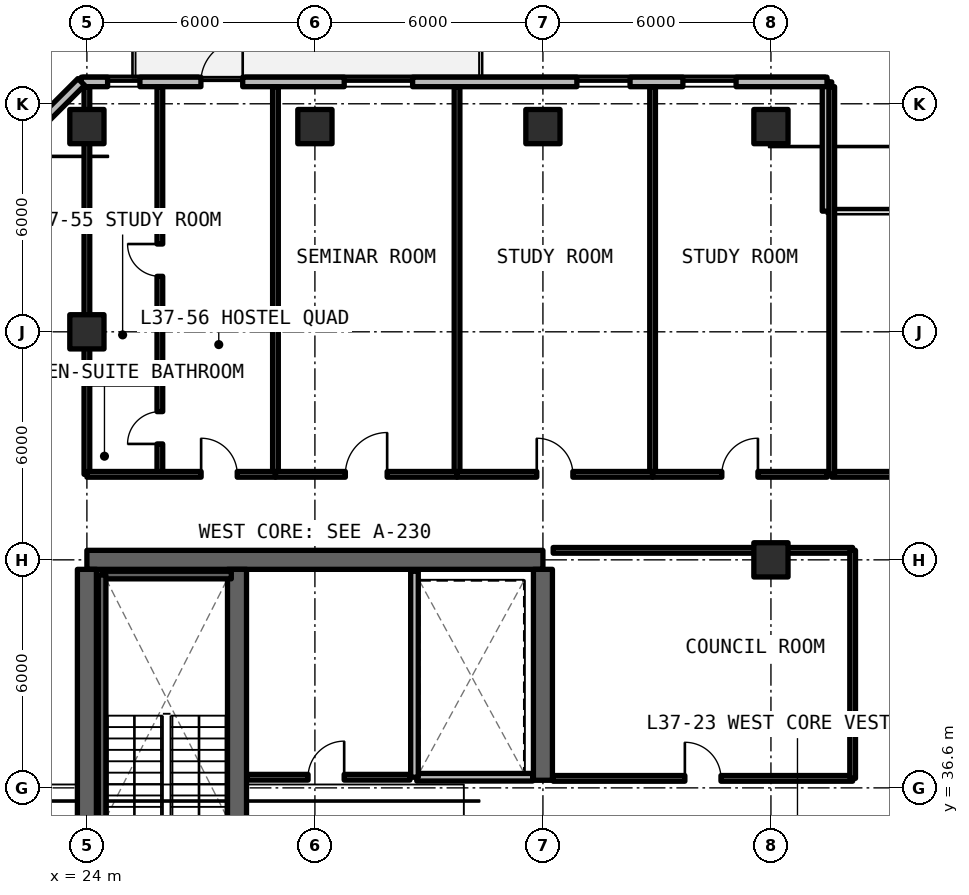
"""IFC4 building model, lengths in metres.
Left out: names, types, materials, properties, quantities, classifications, styles, units other than length and angle.
Written with IfcOpenShell. Run it as: python <this file> out.ifc"""

import sys

from ifc_helpers import new_model, si_unit, direction, frame, frame_2d, origin, origin_2d, place, context, subcontext, project, spatial, rectangle, extrude, element, fill, save


model = new_model("IFC4")
c1 = context("Model", 3, precision=1e-05, world=origin(), true_north=direction((0.0, 1.0)))
c2 = subcontext(c1, "Body", "Model", "MODEL_VIEW")
j1 = project(units=[si_unit("LENGTHUNIT", "METRE"), si_unit("PLANEANGLEUNIT", "RADIAN")], contexts=[c1])
p1 = place(None, origin())
s1 = spatial("IfcSite", under=j1, at=p1, CompositionType="ELEMENT")
p2 = place(p1, origin())
s2 = spatial("IfcBuilding", under=s1, at=p2, CompositionType="ELEMENT")
p3 = place(p2, frame((0.0, 0.0, 135.3)))
s3 = spatial("IfcBuildingStorey", under=s2, at=p3, CompositionType="ELEMENT", Elevation=135.3)
p4 = place(p3, frame((36.0, 42.6, 0.0), z_axis=(0.0, 0.0, 1.0), x_axis=(-1.0, 0.0, 0.0)))
e1 = element("IfcWall", 1, at=p4, inside=s3, PredefinedType="SHEAR", context=c2, shape_type="SweptSolid", body=[
    extrude(rectangle(XDim=12.0, YDim=0.5, at=frame_2d((6.0, 0.0))), origin(), (0.0, 0.0, 1.0), 3.3),
])
p5 = place(p3, frame((24.0, 24.85, 0.0), z_axis=(0.0, 0.0, 1.0), x_axis=(0.0, 1.0, 0.0)))
e2 = element("IfcWall", 2, at=p5, inside=s3, PredefinedType="SHEAR", context=c2, shape_type="SweptSolid", body=[
    extrude(rectangle(XDim=17.5, YDim=0.5, at=frame_2d((8.75, 0.0))), origin(), (0.0, 0.0, 1.0), 3.3),
])
p6 = place(p3, frame((36.0, 36.8, 0.0), z_axis=(0.0, 0.0, 1.0), x_axis=(0.0, 1.0, 0.0)))
e3 = element("IfcWall", 3, at=p6, inside=s3, PredefinedType="SHEAR", context=c2, shape_type="SweptSolid", body=[
    extrude(rectangle(XDim=5.55, YDim=0.5, at=frame_2d((2.775, 0.0))), origin(), (0.0, 0.0, 1.0), 3.3),
])
p7 = place(p3, frame((27.95, 24.85, 0.0), z_axis=(0.0, 0.0, 1.0), x_axis=(0.0, 1.0, 0.0)))
e4 = element("IfcWall", 4, at=p7, inside=s3, PredefinedType="SHEAR", context=c2, shape_type="SweptSolid", body=[
    extrude(rectangle(XDim=17.5, YDim=0.5, at=frame_2d((8.75, 0.0))), origin(), (0.0, 0.0, 1.0), 3.3),
])
p8 = place(p7, frame((0.4, 0.0, 0.0)))
e5 = element("IfcOpeningElement", 5, at=p8, cuts=e4, PredefinedType="OPENING", context=c2, shape_type="SweptSolid", body=[
    extrude(rectangle(XDim=1.15, YDim=2.15, at=frame_2d((0.575, 1.075))), frame((0.0, 0.26, 0.0), z_axis=(0.0, -1.0, 0.0), x_axis=(1.0, 0.0, 0.0)), (0.0, 0.0, 1.0), 0.52),
])
p9 = place(p7, frame((9.6, 0.0, 0.0)))
e6 = element("IfcOpeningElement", 6, at=p9, cuts=e4, PredefinedType="OPENING", context=c2, shape_type="SweptSolid", body=[
    extrude(rectangle(XDim=1.15, YDim=2.15, at=frame_2d((0.575, 1.075))), frame((0.0, 0.26, 0.0), z_axis=(0.0, -1.0, 0.0), x_axis=(1.0, 0.0, 0.0)), (0.0, 0.0, 1.0), 0.52),
])
for number, where, z_axis, x_axis in (
    (7, (42.0, 42.6, 0.0), (0.0, 0.0, 1.0), (1.0, 0.0, 0.0)),
    (8, (24.0, 48.6, 0.0), (0.0, 0.0, 1.0), (1.0, 0.0, 0.0)),
    (9, (24.0, 54.0, 0.0), (0.0, 0.0, 1.0), (1.0, 0.0, 0.0)),
    (10, (30.0, 54.0, 0.0), (0.0, 0.0, 1.0), (1.0, 0.0, 0.0)),
    (11, (36.0, 54.0, 0.0), (0.0, 0.0, 1.0), (1.0, 0.0, 0.0)),
    (12, (42.0, 54.0, 0.0), (0.0, 0.0, 1.0), (1.0, 0.0, 0.0)),
):
    element("IfcColumn", number, at=place(p3, frame(where, z_axis=z_axis, x_axis=x_axis)), inside=s3, PredefinedType="COLUMN", context=c2, shape_type="SweptSolid", body=[
        extrude(rectangle(XDim=0.9, YDim=0.9, at=origin_2d()), origin(), (0.0, 0.0, 1.0), 3.3),
    ])
p10 = place(p3, frame((43.475, 51.775, 0.0), z_axis=(0.0, 0.0, 1.0), x_axis=(0.0, 1.0, 0.0)))
e13 = element("IfcWall", 13, at=p10, inside=s3, PredefinedType="SOLIDWALL", context=c2, shape_type="SweptSolid", body=[
    extrude(rectangle(XDim=3.4, YDim=0.25, at=frame_2d((1.7, 0.0))), origin(), (0.0, 0.0, 1.0), 3.08),
])
p11 = place(p3, frame((43.475, 55.175, 0.0), z_axis=(0.0, 0.0, 1.0), x_axis=(-1.0, 0.0, 0.0)))
e14 = element("IfcWall", 14, at=p11, inside=s3, PredefinedType="SOLIDWALL", context=c2, shape_type="SweptSolid", body=[
    extrude(rectangle(XDim=19.623, YDim=0.25, at=frame_2d((9.812, 0.0))), origin(), (0.0, 0.0, 1.0), 3.08),
])
p12 = place(p11, frame((15.375, 0.0, 0.0)))
e15 = element("IfcOpeningElement", 15, at=p12, cuts=e14, PredefinedType="OPENING", context=c2, shape_type="SweptSolid", body=[
    extrude(rectangle(XDim=1.1, YDim=2.15, at=frame_2d((0.55, 1.075))), frame((0.0, 0.135, 0.0), z_axis=(0.0, -1.0, 0.0), x_axis=(1.0, 0.0, 0.0)), (0.0, 0.0, 1.0), 0.27),
])
p13 = place(p11, frame((18.08, 0.0, 0.78)))
e16 = element("IfcOpeningElement", 16, at=p13, cuts=e14, PredefinedType="OPENING", context=c2, shape_type="SweptSolid", body=[
    extrude(rectangle(XDim=0.85, YDim=1.65, at=frame_2d((0.425, 0.825))), frame((0.0, 0.135, 0.0), z_axis=(0.0, -1.0, 0.0), x_axis=(1.0, 0.0, 0.0)), (0.0, 0.0, 1.0), 0.27),
])
p14 = place(p11, frame((10.904, 0.0, 0.78)))
e17 = element("IfcOpeningElement", 17, at=p14, cuts=e14, PredefinedType="OPENING", context=c2, shape_type="SweptSolid", body=[
    extrude(rectangle(XDim=1.8, YDim=1.66, at=frame_2d((0.9, 0.83))), frame((0.0, 0.135, 0.0), z_axis=(0.0, -1.0, 0.0), x_axis=(1.0, 0.0, 0.0)), (0.0, 0.0, 1.0), 0.27),
])
p15 = place(p11, frame((5.182, 0.0, 0.78)))
e18 = element("IfcOpeningElement", 18, at=p15, cuts=e14, PredefinedType="OPENING", context=c2, shape_type="SweptSolid", body=[
    extrude(rectangle(XDim=1.4, YDim=1.65, at=frame_2d((0.7, 0.825))), frame((0.0, 0.135, 0.0), z_axis=(0.0, -1.0, 0.0), x_axis=(1.0, 0.0, 0.0)), (0.0, 0.0, 1.0), 0.27),
])
p16 = place(p11, frame((2.392, 0.0, 0.78)))
e19 = element("IfcOpeningElement", 19, at=p16, cuts=e14, PredefinedType="OPENING", context=c2, shape_type="SweptSolid", body=[
    extrude(rectangle(XDim=1.4, YDim=1.65, at=frame_2d((0.7, 0.825))), frame((0.0, 0.135, 0.0), z_axis=(0.0, -1.0, 0.0), x_axis=(1.0, 0.0, 0.0)), (0.0, 0.0, 1.0), 0.27),
])
p17 = place(p3, frame((23.852, 55.175, 0.0), z_axis=(0.0, 0.0, 1.0), x_axis=(-0.70708586489, -0.707127696864, 0.0)))
e20 = element("IfcWall", 20, at=p17, inside=s3, PredefinedType="SOLIDWALL", context=c2, shape_type="SweptSolid", body=[
    extrude(rectangle(XDim=5.836, YDim=0.25, at=frame_2d((2.918, 0.0))), origin(), (0.0, 0.0, 1.0), 3.08),
])
p18 = place(p17, frame((1.538, 0.0, 0.78)))
e21 = element("IfcOpeningElement", 21, at=p18, cuts=e20, PredefinedType="OPENING", context=c2, shape_type="SweptSolid", body=[
    extrude(rectangle(XDim=3.4, YDim=1.66, at=frame_2d((1.7, 0.83))), frame((0.0, 0.135, 0.0), z_axis=(0.0, -1.0, 0.0), x_axis=(1.0, 0.0, 0.0)), (0.0, 0.0, 1.0), 0.27),
])
p19 = place(p3, frame((28.22, 36.88, 0.0), z_axis=(0.0, 0.0, 1.0), x_axis=(1.0, 0.0, 0.0)))
e22 = element("IfcWall", 22, at=p19, inside=s3, PredefinedType="SOLIDWALL", context=c2, shape_type="SweptSolid", body=[
    extrude(rectangle(XDim=4.28, YDim=0.15, at=frame_2d((2.14, 0.0))), origin(), (0.0, 0.0, 1.0), 2.35),
])
p20 = place(p19, frame((1.6, 0.0, 0.0)))
e23 = element("IfcOpeningElement", 23, at=p20, cuts=e22, PredefinedType="OPENING", context=c2, shape_type="SweptSolid", body=[
    extrude(rectangle(XDim=0.95, YDim=2.15, at=frame_2d((0.475, 1.075))), frame((0.0, 0.085, 0.0), z_axis=(0.0, -1.0, 0.0), x_axis=(1.0, 0.0, 0.0)), (0.0, 0.0, 1.0), 0.17),
])
p21 = place(p3, frame((32.68, 36.88, 0.0), z_axis=(0.0, 0.0, 1.0), x_axis=(1.0, 0.0, 0.0)))
e24 = element("IfcWall", 24, at=p21, inside=s3, PredefinedType="SOLIDWALL", context=c2, shape_type="SweptSolid", body=[
    extrude(rectangle(XDim=3.05, YDim=0.2, at=frame_2d((1.525, 0.0))), origin(), (0.0, 0.0, 1.0), 2.35),
])
p22 = place(p3, frame((32.62, 36.88, 0.0), z_axis=(0.0, 0.0, 1.0), x_axis=(0.0, 1.0, 0.0)))
e25 = element("IfcWall", 25, at=p22, inside=s3, PredefinedType="SOLIDWALL", context=c2, shape_type="SweptSolid", body=[
    extrude(rectangle(XDim=5.42, YDim=0.2, at=frame_2d((2.71, 0.0))), origin(), (0.0, 0.0, 1.0), 2.35),
])
p23 = place(p3, frame((36.27, 36.85, 0.0), z_axis=(0.0, 0.0, 1.0), x_axis=(1.0, 0.0, 0.0)))
e26 = element("IfcWall", 26, at=p23, inside=s3, PredefinedType="SOLIDWALL", context=c2, shape_type="SweptSolid", body=[
    extrude(rectangle(XDim=7.88, YDim=0.15, at=frame_2d((3.94, 0.0))), origin(), (0.0, 0.0, 1.0), 2.35),
])
p24 = place(p23, frame((3.465, 0.0, 0.0)))
e27 = element("IfcOpeningElement", 27, at=p24, cuts=e26, PredefinedType="OPENING", context=c2, shape_type="SweptSolid", body=[
    extrude(rectangle(XDim=0.95, YDim=2.15, at=frame_2d((0.475, 1.075))), frame((0.0, 0.085, 0.0), z_axis=(0.0, -1.0, 0.0), x_axis=(1.0, 0.0, 0.0)), (0.0, 0.0, 1.0), 0.17),
])
p25 = place(p3, frame((36.27, 42.85, 0.0), z_axis=(0.0, 0.0, 1.0), x_axis=(1.0, 0.0, 0.0)))
e28 = element("IfcWall", 28, at=p25, inside=s3, PredefinedType="SOLIDWALL", context=c2, shape_type="SweptSolid", body=[
    extrude(rectangle(XDim=7.88, YDim=0.15, at=frame_2d((3.94, 0.0))), origin(), (0.0, 0.0, 1.0), 2.35),
])
p26 = place(p3, frame((44.15, 36.85, 0.0), z_axis=(0.0, 0.0, 1.0), x_axis=(0.0, 1.0, 0.0)))
e29 = element("IfcWall", 29, at=p26, inside=s3, PredefinedType="SOLIDWALL", context=c2, shape_type="SweptSolid", body=[
    extrude(rectangle(XDim=6.0, YDim=0.15, at=frame_2d((3.0, 0.0))), origin(), (0.0, 0.0, 1.0), 2.35),
])
p27 = place(p3, frame((43.6, 44.85, 0.0), z_axis=(0.0, 0.0, 1.0), x_axis=(1.0, 0.0, 0.0)))
e30 = element("IfcWall", 30, at=p27, inside=s3, PredefinedType="SOLIDWALL", context=c2, shape_type="SweptSolid", body=[
    extrude(rectangle(XDim=8.4, YDim=0.15, at=frame_2d((4.2, 0.0))), origin(), (0.0, 0.0, 1.0), 2.35),
])
p28 = place(p27, frame((3.65, 0.0, 0.0)))
e31 = element("IfcOpeningElement", 31, at=p28, cuts=e30, PredefinedType="OPENING", context=c2, shape_type="SweptSolid", body=[
    extrude(rectangle(XDim=1.1, YDim=2.15, at=frame_2d((0.55, 1.075))), frame((0.0, 0.085, 0.0), z_axis=(0.0, -1.0, 0.0), x_axis=(1.0, 0.0, 0.0)), (0.0, 0.0, 1.0), 0.17),
])
for number, where, z_axis, x_axis in (
    (32, (43.6, 44.85, 0.0), (0.0, 0.0, 1.0), (0.0, 1.0, 0.0)),
    (33, (24.0, 44.85, 0.0), (0.0, 0.0, 1.0), (0.0, 1.0, 0.0)),
    (34, (28.962, 44.85, 0.0), (0.0, 0.0, 1.0), (0.0, 1.0, 0.0)),
):
    element("IfcWall", number, at=place(p3, frame(where, z_axis=z_axis, x_axis=x_axis)), inside=s3, PredefinedType="SOLIDWALL", context=c2, shape_type="SweptSolid", body=[
        extrude(rectangle(XDim=10.2, YDim=0.15, at=frame_2d((5.1, 0.0))), origin(), (0.0, 0.0, 1.0), 2.35),
    ])
p29 = place(p3, frame((24.0, 47.3, 0.0), z_axis=(0.0, 0.0, 1.0), x_axis=(1.0, 0.0, 0.0)))
e35 = element("IfcWall", 35, at=p29, inside=s3, PredefinedType="PARTITIONING", context=c2, shape_type="SweptSolid", body=[
    extrude(rectangle(XDim=1.92, YDim=0.15, at=frame_2d((0.96, 0.0))), origin(), (0.0, 0.0, 1.0), 2.35),
])
p30 = place(p3, frame((25.92, 44.85, 0.0), z_axis=(0.0, 0.0, 1.0), x_axis=(0.0, 1.0, 0.0)))
e36 = element("IfcWall", 36, at=p30, inside=s3, PredefinedType="PARTITIONING", context=c2, shape_type="SweptSolid", body=[
    extrude(rectangle(XDim=10.2, YDim=0.15, at=frame_2d((5.1, 0.0))), origin(), (0.0, 0.0, 1.0), 2.35),
])
p31 = place(p30, frame((0.8, 0.0, 0.0)))
e37 = element("IfcOpeningElement", 37, at=p31, cuts=e36, PredefinedType="OPENING", context=c2, shape_type="SweptSolid", body=[
    extrude(rectangle(XDim=0.85, YDim=2.1, at=frame_2d((0.425, 1.05))), frame((0.0, 0.085, 0.0), z_axis=(0.0, -1.0, 0.0), x_axis=(1.0, 0.0, 0.0)), (0.0, 0.0, 1.0), 0.17),
])
p32 = place(p30, frame((5.21, 0.0, 0.0)))
e38 = element("IfcOpeningElement", 38, at=p32, cuts=e36, PredefinedType="OPENING", context=c2, shape_type="SweptSolid", body=[
    extrude(rectangle(XDim=0.85, YDim=2.1, at=frame_2d((0.425, 1.05))), frame((0.0, 0.085, 0.0), z_axis=(0.0, -1.0, 0.0), x_axis=(1.0, 0.0, 0.0)), (0.0, 0.0, 1.0), 0.17),
])
p33 = place(p3, frame((24.0, 44.85, 0.0), z_axis=(0.0, 0.0, 1.0), x_axis=(1.0, 0.0, 0.0)))
e39 = element("IfcWall", 39, at=p33, inside=s3, PredefinedType="SOLIDWALL", context=c2, shape_type="SweptSolid", body=[
    extrude(rectangle(XDim=4.962, YDim=0.15, at=frame_2d((2.481, 0.0))), origin(), (0.0, 0.0, 1.0), 2.35),
])
p34 = place(p33, frame((3.006, 0.0, 0.0)))
e40 = element("IfcOpeningElement", 40, at=p34, cuts=e39, PredefinedType="OPENING", context=c2, shape_type="SweptSolid", body=[
    extrude(rectangle(XDim=0.95, YDim=2.15, at=frame_2d((0.475, 1.075))), frame((0.0, 0.085, 0.0), z_axis=(0.0, -1.0, 0.0), x_axis=(1.0, 0.0, 0.0)), (0.0, 0.0, 1.0), 0.17),
])
p35 = place(p3, frame((33.74, 44.85, 0.0), z_axis=(0.0, 0.0, 1.0), x_axis=(0.0, 1.0, 0.0)))
e41 = element("IfcWall", 41, at=p35, inside=s3, PredefinedType="SOLIDWALL", context=c2, shape_type="SweptSolid", body=[
    extrude(rectangle(XDim=10.2, YDim=0.15, at=frame_2d((5.1, 0.0))), origin(), (0.0, 0.0, 1.0), 2.35),
])
p36 = place(p3, frame((28.962, 44.85, 0.0), z_axis=(0.0, 0.0, 1.0), x_axis=(1.0, 0.0, 0.0)))
e42 = element("IfcWall", 42, at=p36, inside=s3, PredefinedType="SOLIDWALL", context=c2, shape_type="SweptSolid", body=[
    extrude(rectangle(XDim=4.778, YDim=0.15, at=frame_2d((2.389, 0.0))), origin(), (0.0, 0.0, 1.0), 2.35),
])
p37 = place(p36, frame((1.839, 0.0, 0.0)))
e43 = element("IfcOpeningElement", 43, at=p37, cuts=e42, PredefinedType="OPENING", context=c2, shape_type="SweptSolid", body=[
    extrude(rectangle(XDim=1.1, YDim=2.15, at=frame_2d((0.55, 1.075))), frame((0.0, 0.085, 0.0), z_axis=(0.0, -1.0, 0.0), x_axis=(1.0, 0.0, 0.0)), (0.0, 0.0, 1.0), 0.17),
])
p38 = place(p3, frame((38.886, 44.85, 0.0), z_axis=(0.0, 0.0, 1.0), x_axis=(0.0, 1.0, 0.0)))
e44 = element("IfcWall", 44, at=p38, inside=s3, PredefinedType="SOLIDWALL", context=c2, shape_type="SweptSolid", body=[
    extrude(rectangle(XDim=10.2, YDim=0.15, at=frame_2d((5.1, 0.0))), origin(), (0.0, 0.0, 1.0), 2.35),
])
p39 = place(p3, frame((33.74, 44.85, 0.0), z_axis=(0.0, 0.0, 1.0), x_axis=(1.0, 0.0, 0.0)))
e45 = element("IfcWall", 45, at=p39, inside=s3, PredefinedType="SOLIDWALL", context=c2, shape_type="SweptSolid", body=[
    extrude(rectangle(XDim=5.146, YDim=0.15, at=frame_2d((2.573, 0.0))), origin(), (0.0, 0.0, 1.0), 2.35),
])
p40 = place(p39, frame((2.098, 0.0, 0.0)))
e46 = element("IfcOpeningElement", 46, at=p40, cuts=e45, PredefinedType="OPENING", context=c2, shape_type="SweptSolid", body=[
    extrude(rectangle(XDim=0.95, YDim=2.15, at=frame_2d((0.475, 1.075))), frame((0.0, 0.085, 0.0), z_axis=(0.0, -1.0, 0.0), x_axis=(1.0, 0.0, 0.0)), (0.0, 0.0, 1.0), 0.17),
])
p41 = place(p3, frame((38.886, 44.85, 0.0), z_axis=(0.0, 0.0, 1.0), x_axis=(1.0, 0.0, 0.0)))
e47 = element("IfcWall", 47, at=p41, inside=s3, PredefinedType="SOLIDWALL", context=c2, shape_type="SweptSolid", body=[
    extrude(rectangle(XDim=4.594, YDim=0.15, at=frame_2d((2.297, 0.0))), origin(), (0.0, 0.0, 1.0), 2.35),
])
p42 = place(p41, frame((1.822, 0.0, 0.0)))
e48 = element("IfcOpeningElement", 48, at=p42, cuts=e47, PredefinedType="OPENING", context=c2, shape_type="SweptSolid", body=[
    extrude(rectangle(XDim=0.95, YDim=2.15, at=frame_2d((0.475, 1.075))), frame((0.0, 0.085, 0.0), z_axis=(0.0, -1.0, 0.0), x_axis=(1.0, 0.0, 0.0)), (0.0, 0.0, 1.0), 0.17),
])
p43 = place(p3, frame((27.8, 42.2, 0.0), z_axis=(0.0, 0.0, 1.0), x_axis=(-1.0, 0.0, 0.0)))
e49 = element("IfcWall", 49, at=p43, inside=s3, PredefinedType="SOLIDWALL", context=c2, shape_type="SweptSolid", body=[
    extrude(rectangle(XDim=3.4, YDim=0.2, at=frame_2d((1.7, 0.0))), origin(), (0.0, 0.0, 1.0), 3.3),
])
p44 = place(p3, frame((24.4, 42.2, 0.0), z_axis=(0.0, 0.0, 1.0), x_axis=(0.0, -1.0, 0.0)))
e50 = element("IfcWall", 50, at=p44, inside=s3, PredefinedType="SOLIDWALL", context=c2, shape_type="SweptSolid", body=[
    extrude(rectangle(XDim=8.0, YDim=0.2, at=frame_2d((4.0, 0.0))), origin(), (0.0, 0.0, 1.0), 3.3),
])
p45 = place(p12, frame((1.1, 0.0, 0.0), z_axis=(0.0, 0.0, 1.0), x_axis=(-1.0, 0.0, 0.0)))
e51 = element("IfcDoor", 51, at=p45, inside=s3, OperationType="SINGLE_SWING_RIGHT", PredefinedType="DOOR", context=c2, shape_type="SweptSolid", body=[
    extrude(rectangle(XDim=1.1, YDim=2.15, at=frame_2d((0.55, 1.075))), frame((0.0, 0.025, 0.0), z_axis=(0.0, -1.0, 0.0), x_axis=(1.0, 0.0, 0.0)), (0.0, 0.0, 1.0), 0.05),
])
fill(e15, e51)
p46 = place(p13, origin())
e52 = element("IfcWindow", 52, at=p46, inside=s3, PartitioningType="SINGLE_PANEL", PredefinedType="WINDOW", context=c2, shape_type="SweptSolid", body=[
    extrude(rectangle(XDim=0.85, YDim=1.65, at=frame_2d((0.425, 0.825))), frame((0.0, 0.03, 0.0), z_axis=(0.0, -1.0, 0.0), x_axis=(1.0, 0.0, 0.0)), (0.0, 0.0, 1.0), 0.06),
])
fill(e16, e52)
p47 = place(p14, origin())
e53 = element("IfcWindow", 53, at=p47, inside=s3, PartitioningType="SINGLE_PANEL", PredefinedType="WINDOW", context=c2, shape_type="SweptSolid", body=[
    extrude(rectangle(XDim=1.8, YDim=1.66, at=frame_2d((0.9, 0.83))), frame((0.0, 0.03, 0.0), z_axis=(0.0, -1.0, 0.0), x_axis=(1.0, 0.0, 0.0)), (0.0, 0.0, 1.0), 0.06),
])
fill(e17, e53)
p48 = place(p15, origin())
e54 = element("IfcWindow", 54, at=p48, inside=s3, PartitioningType="SINGLE_PANEL", PredefinedType="WINDOW", context=c2, shape_type="SweptSolid", body=[
    extrude(rectangle(XDim=1.4, YDim=1.65, at=frame_2d((0.7, 0.825))), frame((0.0, 0.03, 0.0), z_axis=(0.0, -1.0, 0.0), x_axis=(1.0, 0.0, 0.0)), (0.0, 0.0, 1.0), 0.06),
])
fill(e18, e54)
p49 = place(p16, origin())
e55 = element("IfcWindow", 55, at=p49, inside=s3, PartitioningType="SINGLE_PANEL", PredefinedType="WINDOW", context=c2, shape_type="SweptSolid", body=[
    extrude(rectangle(XDim=1.4, YDim=1.65, at=frame_2d((0.7, 0.825))), frame((0.0, 0.03, 0.0), z_axis=(0.0, -1.0, 0.0), x_axis=(1.0, 0.0, 0.0)), (0.0, 0.0, 1.0), 0.06),
])
fill(e19, e55)
p50 = place(p20, origin())
e56 = element("IfcDoor", 56, at=p50, inside=s3, OperationType="SINGLE_SWING_RIGHT", PredefinedType="DOOR", context=c2, shape_type="SweptSolid", body=[
    extrude(rectangle(XDim=0.95, YDim=2.15, at=frame_2d((0.475, 1.075))), frame((0.0, 0.025, 0.0), z_axis=(0.0, -1.0, 0.0), x_axis=(1.0, 0.0, 0.0)), (0.0, 0.0, 1.0), 0.05),
])
fill(e23, e56)
p51 = place(p24, origin())
e57 = element("IfcDoor", 57, at=p51, inside=s3, OperationType="SINGLE_SWING_LEFT", PredefinedType="DOOR", context=c2, shape_type="SweptSolid", body=[
    extrude(rectangle(XDim=0.95, YDim=2.15, at=frame_2d((0.475, 1.075))), frame((0.0, 0.025, 0.0), z_axis=(0.0, -1.0, 0.0), x_axis=(1.0, 0.0, 0.0)), (0.0, 0.0, 1.0), 0.05),
])
fill(e27, e57)
p52 = place(p31, origin())
e58 = element("IfcDoor", 58, at=p52, inside=s3, OperationType="SINGLE_SWING_LEFT", PredefinedType="DOOR", context=c2, shape_type="SweptSolid", body=[
    extrude(rectangle(XDim=0.85, YDim=2.1, at=frame_2d((0.425, 1.05))), frame((0.0, 0.025, 0.0), z_axis=(0.0, -1.0, 0.0), x_axis=(1.0, 0.0, 0.0)), (0.0, 0.0, 1.0), 0.05),
])
fill(e37, e58)
p53 = place(p32, origin())
e59 = element("IfcDoor", 59, at=p53, inside=s3, OperationType="SINGLE_SWING_RIGHT", PredefinedType="DOOR", context=c2, shape_type="SweptSolid", body=[
    extrude(rectangle(XDim=0.85, YDim=2.1, at=frame_2d((0.425, 1.05))), frame((0.0, 0.025, 0.0), z_axis=(0.0, -1.0, 0.0), x_axis=(1.0, 0.0, 0.0)), (0.0, 0.0, 1.0), 0.05),
])
fill(e38, e59)
p54 = place(p34, origin())
e60 = element("IfcDoor", 60, at=p54, inside=s3, OperationType="SINGLE_SWING_LEFT", PredefinedType="DOOR", context=c2, shape_type="SweptSolid", body=[
    extrude(rectangle(XDim=0.95, YDim=2.15, at=frame_2d((0.475, 1.075))), frame((0.0, 0.025, 0.0), z_axis=(0.0, -1.0, 0.0), x_axis=(1.0, 0.0, 0.0)), (0.0, 0.0, 1.0), 0.05),
])
fill(e40, e60)
p55 = place(p37, origin())
e61 = element("IfcDoor", 61, at=p55, inside=s3, OperationType="SINGLE_SWING_RIGHT", PredefinedType="DOOR", context=c2, shape_type="SweptSolid", body=[
    extrude(rectangle(XDim=1.1, YDim=2.15, at=frame_2d((0.55, 1.075))), frame((0.0, 0.025, 0.0), z_axis=(0.0, -1.0, 0.0), x_axis=(1.0, 0.0, 0.0)), (0.0, 0.0, 1.0), 0.05),
])
fill(e43, e61)
p56 = place(p40, origin())
e62 = element("IfcDoor", 62, at=p56, inside=s3, OperationType="SINGLE_SWING_LEFT", PredefinedType="DOOR", context=c2, shape_type="SweptSolid", body=[
    extrude(rectangle(XDim=0.95, YDim=2.15, at=frame_2d((0.475, 1.075))), frame((0.0, 0.025, 0.0), z_axis=(0.0, -1.0, 0.0), x_axis=(1.0, 0.0, 0.0)), (0.0, 0.0, 1.0), 0.05),
])
fill(e46, e62)
p57 = place(p42, origin())
e63 = element("IfcDoor", 63, at=p57, inside=s3, OperationType="SINGLE_SWING_RIGHT", PredefinedType="DOOR", context=c2, shape_type="SweptSolid", body=[
    extrude(rectangle(XDim=0.95, YDim=2.15, at=frame_2d((0.475, 1.075))), frame((0.0, 0.025, 0.0), z_axis=(0.0, -1.0, 0.0), x_axis=(1.0, 0.0, 0.0)), (0.0, 0.0, 1.0), 0.05),
])
fill(e48, e63)
save(model, sys.argv[1])
